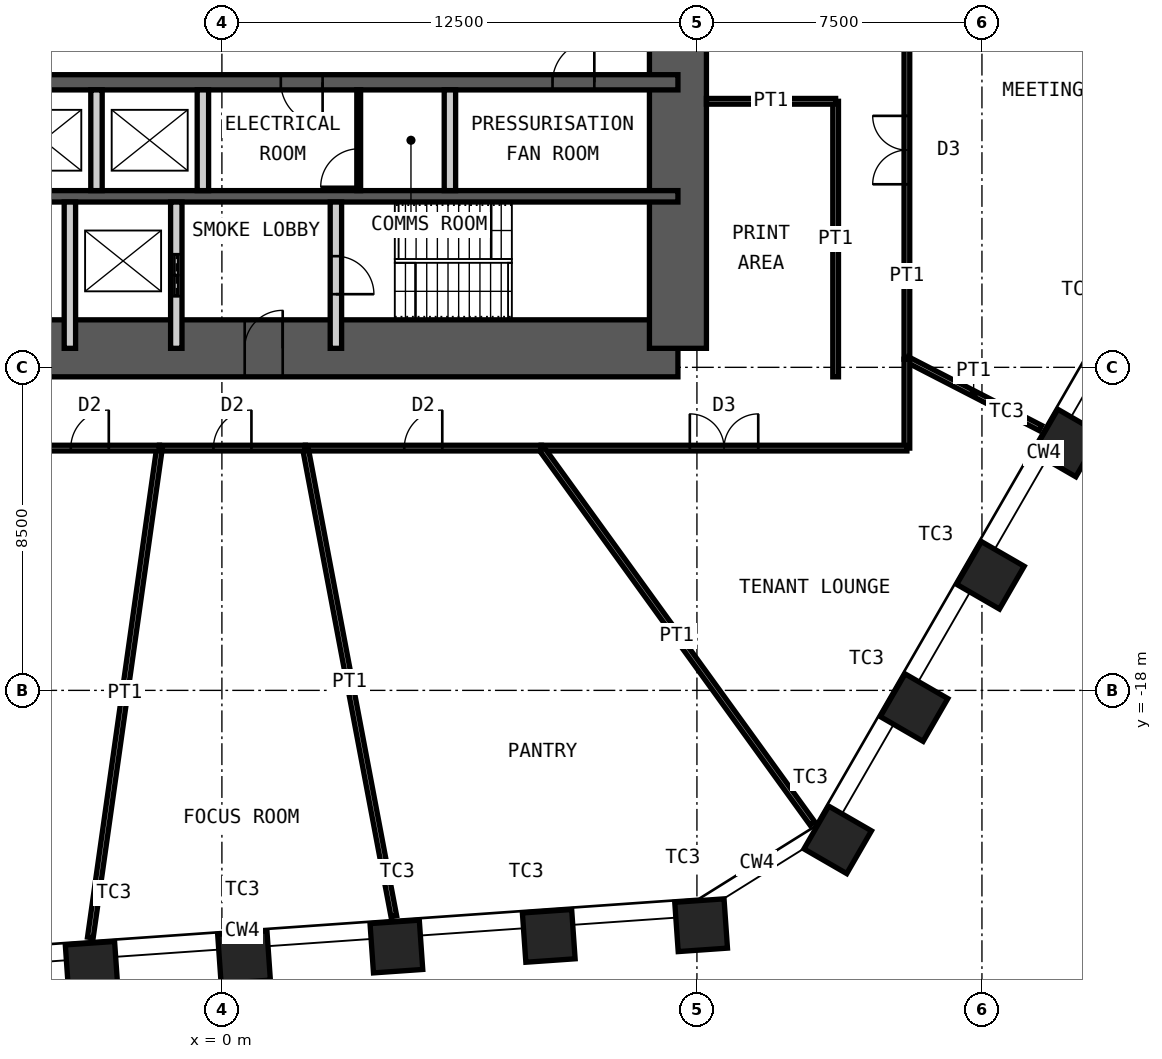
"""IFC4 building model, lengths in metres.
Left out: names, types, materials, properties, quantities, classifications, styles, units other than length and angle.
Written with IfcOpenShell. Run it as: python <this file> out.ifc"""

import sys

from ifc_helpers import new_model, si_unit, direction, frame, frame_2d, origin, origin_2d, place, context, subcontext, project, spatial, rectangle, hollow_rectangle, extrude, element, fill, save


model = new_model("IFC4")
c1 = context("Model", 3, precision=1e-05, world=origin(), true_north=direction((0.0, 1.0)))
c2 = subcontext(c1, "Body", "Model", "MODEL_VIEW")
j1 = project(units=[si_unit("LENGTHUNIT", "METRE"), si_unit("PLANEANGLEUNIT", "RADIAN")], contexts=[c1])
p1 = place(None, origin())
s1 = spatial("IfcSite", under=j1, at=p1, CompositionType="ELEMENT")
p2 = place(p1, origin())
s2 = spatial("IfcBuilding", under=s1, at=p2, CompositionType="ELEMENT")
p3 = place(p2, frame((0.0, 0.0, 119.8)))
s3 = spatial("IfcBuildingStorey", under=s2, at=p3, CompositionType="ELEMENT", Elevation=119.8)
for number, where, z_axis, x_axis in (
    (1, (22.233, -11.491, 0.0), (0.0, 0.0, 1.0), (0.5, 0.866, 0.0)),
    (2, (20.223, -14.972, 0.0), (0.0, 0.0, 1.0), (0.5, 0.866, 0.0)),
    (3, (18.214, -18.453, 0.0), (0.0, 0.0, 1.0), (0.5, 0.866, 0.0)),
    (4, (16.204, -21.933, 0.0), (0.0, 0.0, 1.0), (0.5, 0.866, 0.0)),
    (5, (12.61, -24.179, 0.0), (0.0, 0.0, 1.0), (0.998, 0.07, 0.0)),
    (6, (8.601, -24.46, 0.0), (0.0, 0.0, 1.0), (0.998, 0.07, 0.0)),
    (7, (4.592, -24.74, 0.0), (0.0, 0.0, 1.0), (0.998, 0.07, 0.0)),
    (8, (0.582, -25.02, 0.0), (0.0, 0.0, 1.0), (0.998, 0.07, 0.0)),
    (9, (-3.427, -25.301, 0.0), (0.0, 0.0, 1.0), (0.998, 0.07, 0.0)),
):
    element("IfcColumn", number, at=place(p3, frame(where, z_axis=z_axis, x_axis=x_axis)), inside=s3, PredefinedType="COLUMN", context=c2, shape_type="SweptSolid", body=[
        extrude(hollow_rectangle(XDim=1.3, YDim=1.3, WallThickness=0.1, at=origin_2d()), origin(), (0.0, 0.0, 1.0), 4.2),
    ])
p4 = place(p3, frame((-12.0, -9.0, 0.0), z_axis=(0.0, 0.0, 1.0), x_axis=(1.0, 0.0, 0.0)))
e10 = element("IfcWall", 10, at=p4, inside=s3, PredefinedType="SHEAR", context=c2, shape_type="SweptSolid", body=[
    extrude(rectangle(XDim=24.0, YDim=1.5, at=frame_2d((12.0, 0.0))), origin(), (0.0, 0.0, 1.0), 4.2),
])
p5 = place(p4, frame((1.35, 0.0, 0.0)))
e11 = element("IfcOpeningElement", 11, at=p5, cuts=e10, PredefinedType="OPENING", context=c2, shape_type="SweptSolid", body=[
    extrude(rectangle(XDim=1.0, YDim=2.1, at=frame_2d((0.5, 1.05))), frame((0.0, 0.76, 0.0), z_axis=(0.0, -1.0, 0.0), x_axis=(1.0, 0.0, 0.0)), (0.0, 0.0, 1.0), 1.52),
])
p6 = place(p4, frame((5.325, 0.0, 0.0)))
e12 = element("IfcOpeningElement", 12, at=p6, cuts=e10, PredefinedType="OPENING", context=c2, shape_type="SweptSolid", body=[
    extrude(rectangle(XDim=1.15, YDim=2.1, at=frame_2d((0.575, 1.05))), frame((0.0, 0.76, 0.0), z_axis=(0.0, -1.0, 0.0), x_axis=(1.0, 0.0, 0.0)), (0.0, 0.0, 1.0), 1.52),
])
p7 = place(p4, frame((12.6, 0.0, 0.0)))
e13 = element("IfcOpeningElement", 13, at=p7, cuts=e10, PredefinedType="OPENING", context=c2, shape_type="SweptSolid", body=[
    extrude(rectangle(XDim=1.0, YDim=2.1, at=frame_2d((0.5, 1.05))), frame((0.0, 0.76, 0.0), z_axis=(0.0, -1.0, 0.0), x_axis=(1.0, 0.0, 0.0)), (0.0, 0.0, 1.0), 1.52),
])
p8 = place(p3, frame((12.0, -9.0, 0.0), z_axis=(0.0, 0.0, 1.0), x_axis=(0.0, 1.0, 0.0)))
e14 = element("IfcWall", 14, at=p8, inside=s3, PredefinedType="SHEAR", context=c2, shape_type="SweptSolid", body=[
    extrude(rectangle(XDim=18.0, YDim=1.5, at=frame_2d((9.0, 0.0))), origin(), (0.0, 0.0, 1.0), 4.2),
])
p9 = place(p8, frame((8.1, 0.0, 0.0)))
e15 = element("IfcOpeningElement", 15, at=p9, cuts=e14, PredefinedType="OPENING", context=c2, shape_type="SweptSolid", body=[
    extrude(rectangle(XDim=1.8, YDim=2.1, at=frame_2d((0.9, 1.05))), frame((0.0, 0.76, 0.0), z_axis=(0.0, -1.0, 0.0), x_axis=(1.0, 0.0, 0.0)), (0.0, 0.0, 1.0), 1.52),
])
p10 = place(p3, frame((-12.0, -2.0, 0.0), z_axis=(0.0, 0.0, 1.0), x_axis=(1.0, 0.0, 0.0)))
e16 = element("IfcWall", 16, at=p10, inside=s3, PredefinedType="SHEAR", context=c2, shape_type="SweptSolid", body=[
    extrude(rectangle(XDim=24.0, YDim=0.4, at=frame_2d((12.0, 0.0))), origin(), (0.0, 0.0, 1.0), 4.2),
])
p11 = place(p10, frame((1.1, 0.0, 0.0)))
e17 = element("IfcOpeningElement", 17, at=p11, cuts=e16, PredefinedType="OPENING", context=c2, shape_type="SweptSolid", body=[
    extrude(rectangle(XDim=1.1, YDim=2.1, at=frame_2d((0.55, 1.05))), frame((0.0, 0.21, 0.0), z_axis=(0.0, -1.0, 0.0), x_axis=(1.0, 0.0, 0.0)), (0.0, 0.0, 1.0), 0.42),
])
p12 = place(p10, frame((13.55, 0.0, 0.0)))
e18 = element("IfcOpeningElement", 18, at=p12, cuts=e16, PredefinedType="OPENING", context=c2, shape_type="SweptSolid", body=[
    extrude(rectangle(XDim=1.1, YDim=2.1, at=frame_2d((0.55, 1.05))), frame((0.0, 0.21, 0.0), z_axis=(0.0, -1.0, 0.0), x_axis=(1.0, 0.0, 0.0)), (0.0, 0.0, 1.0), 0.42),
])
p13 = place(p10, frame((20.7, 0.0, 0.0)))
e19 = element("IfcOpeningElement", 19, at=p13, cuts=e16, PredefinedType="OPENING", context=c2, shape_type="SweptSolid", body=[
    extrude(rectangle(XDim=1.1, YDim=2.1, at=frame_2d((0.55, 1.05))), frame((0.0, 0.21, 0.0), z_axis=(0.0, -1.0, 0.0), x_axis=(1.0, 0.0, 0.0)), (0.0, 0.0, 1.0), 0.42),
])
p14 = place(p10, frame((4.0, 0.0, 0.0)))
e20 = element("IfcOpeningElement", 20, at=p14, cuts=e16, PredefinedType="OPENING", context=c2, shape_type="SweptSolid", body=[
    extrude(rectangle(XDim=1.0, YDim=2.1, at=frame_2d((0.5, 1.05))), frame((0.0, 0.21, 0.0), z_axis=(0.0, -1.0, 0.0), x_axis=(1.0, 0.0, 0.0)), (0.0, 0.0, 1.0), 0.42),
])
p15 = place(p3, frame((-12.0, -5.0, 0.0), z_axis=(0.0, 0.0, 1.0), x_axis=(1.0, 0.0, 0.0)))
e21 = element("IfcWall", 21, at=p15, inside=s3, PredefinedType="SHEAR", context=c2, shape_type="SweptSolid", body=[
    extrude(rectangle(XDim=24.0, YDim=0.3, at=frame_2d((12.0, 0.0))), origin(), (0.0, 0.0, 1.0), 4.2),
])
for number, where, z_axis, x_axis in (
    (22, (-3.3, -4.85, 0.0), (0.0, 0.0, 1.0), (0.0, 1.0, 0.0)),
    (23, (-0.5, -4.85, 0.0), (0.0, 0.0, 1.0), (0.0, 1.0, 0.0)),
    (24, (6.0, -4.85, 0.0), (0.0, 0.0, 1.0), (0.0, 1.0, 0.0)),
):
    element("IfcWall", number, at=place(p3, frame(where, z_axis=z_axis, x_axis=x_axis)), inside=s3, PredefinedType="PARTITIONING", context=c2, shape_type="SweptSolid", body=[
        extrude(rectangle(XDim=2.65, YDim=0.3, at=frame_2d((1.325, 0.0))), origin(), (0.0, 0.0, 1.0), 3.98),
    ])
p16 = place(p3, frame((-4.0, -9.0, 0.0), z_axis=(0.0, 0.0, 1.0), x_axis=(0.0, 1.0, 0.0)))
e25 = element("IfcWall", 25, at=p16, inside=s3, PredefinedType="PARTITIONING", context=c2, shape_type="SweptSolid", body=[
    extrude(rectangle(XDim=3.85, YDim=0.3, at=frame_2d((1.925, 0.0))), origin(), (0.0, 0.0, 1.0), 3.98),
])
p17 = place(p3, frame((-1.2, -9.0, 0.0), z_axis=(0.0, 0.0, 1.0), x_axis=(0.0, 1.0, 0.0)))
e26 = element("IfcWall", 26, at=p17, inside=s3, PredefinedType="PARTITIONING", context=c2, shape_type="SweptSolid", body=[
    extrude(rectangle(XDim=3.85, YDim=0.3, at=frame_2d((1.925, 0.0))), origin(), (0.0, 0.0, 1.0), 3.98),
])
p18 = place(p17, frame((1.375, 0.0, 0.0)))
e27 = element("IfcOpeningElement", 27, at=p18, cuts=e26, PredefinedType="OPENING", context=c2, shape_type="SweptSolid", body=[
    extrude(rectangle(XDim=1.1, YDim=2.4, at=frame_2d((0.55, 1.2))), frame((0.0, 0.16, 0.0), z_axis=(0.0, -1.0, 0.0), x_axis=(1.0, 0.0, 0.0)), (0.0, 0.0, 1.0), 0.32),
])
p19 = place(p3, frame((3.0, -9.0, 0.0), z_axis=(0.0, 0.0, 1.0), x_axis=(0.0, 1.0, 0.0)))
e28 = element("IfcWall", 28, at=p19, inside=s3, PredefinedType="PARTITIONING", context=c2, shape_type="SweptSolid", body=[
    extrude(rectangle(XDim=3.85, YDim=0.3, at=frame_2d((1.925, 0.0))), origin(), (0.0, 0.0, 1.0), 3.98),
])
p20 = place(p19, frame((1.425, 0.0, 0.0)))
e29 = element("IfcOpeningElement", 29, at=p20, cuts=e28, PredefinedType="OPENING", context=c2, shape_type="SweptSolid", body=[
    extrude(rectangle(XDim=1.0, YDim=2.1, at=frame_2d((0.5, 1.05))), frame((0.0, 0.16, 0.0), z_axis=(0.0, -1.0, 0.0), x_axis=(1.0, 0.0, 0.0)), (0.0, 0.0, 1.0), 0.32),
])
p21 = place(p3, frame((3.6, -4.85, 0.0), z_axis=(0.0, 0.0, 1.0), x_axis=(0.0, 1.0, 0.0)))
e30 = element("IfcWall", 30, at=p21, inside=s3, PredefinedType="PARTITIONING", context=c2, shape_type="SweptSolid", body=[
    extrude(rectangle(XDim=2.65, YDim=0.1, at=frame_2d((1.325, 0.0))), origin(), (0.0, 0.0, 1.0), 3.98),
])
p22 = place(p21, frame((0.1, 0.0, 0.0)))
e31 = element("IfcOpeningElement", 31, at=p22, cuts=e30, PredefinedType="OPENING", context=c2, shape_type="SweptSolid", body=[
    extrude(rectangle(XDim=1.0, YDim=2.4, at=frame_2d((0.5, 1.2))), frame((0.0, 0.06, 0.0), z_axis=(0.0, -1.0, 0.0), x_axis=(1.0, 0.0, 0.0)), (0.0, 0.0, 1.0), 0.12),
])
p23 = place(p3, frame((18.025, 1.719, 0.0), z_axis=(0.0, 0.0, 1.0), x_axis=(0.0, -1.0, 0.0)))
e32 = element("IfcWall", 32, at=p23, inside=s3, PredefinedType="PARTITIONING", context=c2, shape_type="SweptSolid", body=[
    extrude(rectangle(XDim=11.006, YDim=0.15, at=frame_2d((5.503, 0.0))), origin(), (0.0, 0.0, 1.0), 4.03),
])
p24 = place(p23, frame((4.603, 0.0, 0.0)))
e33 = element("IfcOpeningElement", 33, at=p24, cuts=e32, PredefinedType="OPENING", context=c2, shape_type="SweptSolid", body=[
    extrude(rectangle(XDim=1.8, YDim=2.4, at=frame_2d((0.9, 1.2))), frame((0.0, 0.085, 0.0), z_axis=(0.0, -1.0, 0.0), x_axis=(1.0, 0.0, 0.0)), (0.0, 0.0, 1.0), 0.17),
])
p25 = place(p3, frame((21.538, -11.096, 0.0), z_axis=(0.0, 0.0, 1.0), x_axis=(-0.888987513346, 0.457931437134, 0.0)))
e34 = element("IfcWall", 34, at=p25, inside=s3, PredefinedType="PARTITIONING", context=c2, shape_type="SweptSolid", body=[
    extrude(rectangle(XDim=3.952, YDim=0.15, at=frame_2d((1.976, 0.0))), origin(), (0.0, 0.0, 1.0), 3.33),
])
p26 = place(p3, frame((18.025, -9.286, 0.0), z_axis=(0.0, 0.0, 1.0), x_axis=(0.0, -1.0, 0.0)))
e35 = element("IfcWall", 35, at=p26, inside=s3, PredefinedType="PARTITIONING", context=c2, shape_type="SweptSolid", body=[
    extrude(rectangle(XDim=2.339, YDim=0.15, at=frame_2d((1.169, 0.0))), origin(), (0.0, 0.0, 1.0), 4.03),
])
p27 = place(p3, frame((18.025, -11.625, 0.0), z_axis=(0.0, 0.0, 1.0), x_axis=(-1.0, 0.0, 0.0)))
e36 = element("IfcWall", 36, at=p27, inside=s3, PredefinedType="PARTITIONING", context=c2, shape_type="SweptSolid", body=[
    extrude(rectangle(XDim=9.624, YDim=0.15, at=frame_2d((4.812, 0.0))), origin(), (0.0, 0.0, 1.0), 4.03),
])
p28 = place(p27, frame((3.912, 0.0, 0.0)))
e37 = element("IfcOpeningElement", 37, at=p28, cuts=e36, PredefinedType="OPENING", context=c2, shape_type="SweptSolid", body=[
    extrude(rectangle(XDim=1.8, YDim=2.4, at=frame_2d((0.9, 1.2))), frame((0.0, 0.085, 0.0), z_axis=(0.0, -1.0, 0.0), x_axis=(1.0, 0.0, 0.0)), (0.0, 0.0, 1.0), 0.17),
])
p29 = place(p3, frame((15.54, -21.502, 0.0), z_axis=(0.0, 0.0, 1.0), x_axis=(-0.585731902034, 0.810504866697, 0.0)))
e38 = element("IfcWall", 38, at=p29, inside=s3, PredefinedType="PARTITIONING", context=c2, shape_type="SweptSolid", body=[
    extrude(rectangle(XDim=12.187, YDim=0.15, at=frame_2d((6.093, 0.0))), origin(), (0.0, 0.0, 1.0), 2.93),
])
p30 = place(p3, frame((8.401, -11.625, 0.0), z_axis=(0.0, 0.0, 1.0), x_axis=(-1.0, 0.0, 0.0)))
e39 = element("IfcWall", 39, at=p30, inside=s3, PredefinedType="PARTITIONING", context=c2, shape_type="SweptSolid", body=[
    extrude(rectangle(XDim=6.205, YDim=0.15, at=frame_2d((3.103, 0.0))), origin(), (0.0, 0.0, 1.0), 4.03),
])
p31 = place(p30, frame((2.602, 0.0, 0.0)))
e40 = element("IfcOpeningElement", 40, at=p31, cuts=e39, PredefinedType="OPENING", context=c2, shape_type="SweptSolid", body=[
    extrude(rectangle(XDim=1.0, YDim=2.4, at=frame_2d((0.5, 1.2))), frame((0.0, 0.085, 0.0), z_axis=(0.0, -1.0, 0.0), x_axis=(1.0, 0.0, 0.0)), (0.0, 0.0, 1.0), 0.17),
])
p32 = place(p3, frame((4.524, -23.943, 0.0), z_axis=(0.0, 0.0, 1.0), x_axis=(-0.185671124909, 0.98261194445, 0.0)))
e41 = element("IfcWall", 41, at=p32, inside=s3, PredefinedType="PARTITIONING", context=c2, shape_type="SweptSolid", body=[
    extrude(rectangle(XDim=12.536, YDim=0.15, at=frame_2d((6.268, 0.0))), origin(), (0.0, 0.0, 1.0), 3.33),
])
p33 = place(p3, frame((2.197, -11.625, 0.0), z_axis=(0.0, 0.0, 1.0), x_axis=(-1.0, 0.0, 0.0)))
e42 = element("IfcWall", 42, at=p33, inside=s3, PredefinedType="PARTITIONING", context=c2, shape_type="SweptSolid", body=[
    extrude(rectangle(XDim=3.839, YDim=0.15, at=frame_2d((1.919, 0.0))), origin(), (0.0, 0.0, 1.0), 4.03),
])
p34 = place(p33, frame((1.419, 0.0, 0.0)))
e43 = element("IfcOpeningElement", 43, at=p34, cuts=e42, PredefinedType="OPENING", context=c2, shape_type="SweptSolid", body=[
    extrude(rectangle(XDim=1.0, YDim=2.4, at=frame_2d((0.5, 1.2))), frame((0.0, 0.085, 0.0), z_axis=(0.0, -1.0, 0.0), x_axis=(1.0, 0.0, 0.0)), (0.0, 0.0, 1.0), 0.17),
])
p35 = place(p3, frame((-3.462, -24.503, 0.0), z_axis=(0.0, 0.0, 1.0), x_axis=(0.139899618934, 0.990165691499, 0.0)))
e44 = element("IfcWall", 44, at=p35, inside=s3, PredefinedType="PARTITIONING", context=c2, shape_type="SweptSolid", body=[
    extrude(rectangle(XDim=13.006, YDim=0.15, at=frame_2d((6.503, 0.0))), origin(), (0.0, 0.0, 1.0), 3.33),
])
p36 = place(p3, frame((-1.642, -11.625, 0.0), z_axis=(0.0, 0.0, 1.0), x_axis=(-1.0, 0.0, 0.0)))
e45 = element("IfcWall", 45, at=p36, inside=s3, PredefinedType="PARTITIONING", context=c2, shape_type="SweptSolid", body=[
    extrude(rectangle(XDim=3.668, YDim=0.15, at=frame_2d((1.834, 0.0))), origin(), (0.0, 0.0, 1.0), 4.03),
])
p37 = place(p36, frame((1.334, 0.0, 0.0)))
e46 = element("IfcOpeningElement", 46, at=p37, cuts=e45, PredefinedType="OPENING", context=c2, shape_type="SweptSolid", body=[
    extrude(rectangle(XDim=1.0, YDim=2.4, at=frame_2d((0.5, 1.2))), frame((0.0, 0.085, 0.0), z_axis=(0.0, -1.0, 0.0), x_axis=(1.0, 0.0, 0.0)), (0.0, 0.0, 1.0), 0.17),
])
p38 = place(p3, frame((16.15, -9.75, 0.0), z_axis=(0.0, 0.0, 1.0), x_axis=(0.0, 1.0, 0.0)))
e47 = element("IfcWall", 47, at=p38, inside=s3, PredefinedType="PARTITIONING", context=c2, shape_type="SweptSolid", body=[
    extrude(rectangle(XDim=7.25, YDim=0.15, at=frame_2d((3.625, 0.0))), origin(), (0.0, 0.0, 1.0), 4.03),
])
p39 = place(p3, frame((12.75, -2.5, 0.0), z_axis=(0.0, 0.0, 1.0), x_axis=(1.0, 0.0, 0.0)))
e48 = element("IfcWall", 48, at=p39, inside=s3, PredefinedType="PARTITIONING", context=c2, shape_type="SweptSolid", body=[
    extrude(rectangle(XDim=3.4, YDim=0.15, at=frame_2d((1.7, 0.0))), origin(), (0.0, 0.0, 1.0), 3.33),
])
p40 = place(p7, origin())
e49 = element("IfcDoor", 49, at=p40, inside=s3, OperationType="SINGLE_SWING_LEFT", PredefinedType="DOOR", context=c2, shape_type="SweptSolid", body=[
    extrude(rectangle(XDim=1.0, YDim=2.1, at=frame_2d((0.5, 1.05))), frame((0.0, 0.025, 0.0), z_axis=(0.0, -1.0, 0.0), x_axis=(1.0, 0.0, 0.0)), (0.0, 0.0, 1.0), 0.05),
])
fill(e13, e49)
p41 = place(p20, origin())
e50 = element("IfcDoor", 50, at=p41, inside=s3, OperationType="SINGLE_SWING_LEFT", PredefinedType="DOOR", context=c2, shape_type="SweptSolid", body=[
    extrude(rectangle(XDim=1.0, YDim=2.1, at=frame_2d((0.5, 1.05))), frame((0.0, 0.025, 0.0), z_axis=(0.0, -1.0, 0.0), x_axis=(1.0, 0.0, 0.0)), (0.0, 0.0, 1.0), 0.05),
])
fill(e29, e50)
p42 = place(p12, origin())
e51 = element("IfcDoor", 51, at=p42, inside=s3, OperationType="SINGLE_SWING_RIGHT", PredefinedType="DOOR", context=c2, shape_type="SweptSolid", body=[
    extrude(rectangle(XDim=1.1, YDim=2.1, at=frame_2d((0.55, 1.05))), frame((0.0, 0.025, 0.0), z_axis=(0.0, -1.0, 0.0), x_axis=(1.0, 0.0, 0.0)), (0.0, 0.0, 1.0), 0.05),
])
fill(e18, e51)
p43 = place(p13, origin())
e52 = element("IfcDoor", 52, at=p43, inside=s3, OperationType="SINGLE_SWING_LEFT", PredefinedType="DOOR", context=c2, shape_type="SweptSolid", body=[
    extrude(rectangle(XDim=1.1, YDim=2.1, at=frame_2d((0.55, 1.05))), frame((0.0, 0.025, 0.0), z_axis=(0.0, -1.0, 0.0), x_axis=(1.0, 0.0, 0.0)), (0.0, 0.0, 1.0), 0.05),
])
fill(e19, e52)
p44 = place(p18, origin())
e53 = element("IfcDoor", 53, at=p44, inside=s3, OperationType="DOUBLE_DOOR_SLIDING", PredefinedType="DOOR", context=c2, shape_type="SweptSolid", body=[
    extrude(rectangle(XDim=1.1, YDim=2.4, at=frame_2d((0.55, 1.2))), frame((0.0, 0.025, 0.0), z_axis=(0.0, -1.0, 0.0), x_axis=(1.0, 0.0, 0.0)), (0.0, 0.0, 1.0), 0.05),
])
fill(e27, e53)
p45 = place(p22, origin())
e54 = element("IfcDoor", 54, at=p45, inside=s3, OperationType="SINGLE_SWING_RIGHT", PredefinedType="DOOR", context=c2, shape_type="SweptSolid", body=[
    extrude(rectangle(XDim=1.0, YDim=2.4, at=frame_2d((0.5, 1.2))), frame((0.0, 0.025, 0.0), z_axis=(0.0, -1.0, 0.0), x_axis=(1.0, 0.0, 0.0)), (0.0, 0.0, 1.0), 0.05),
])
fill(e31, e54)
p46 = place(p24, origin())
e55 = element("IfcDoor", 55, at=p46, inside=s3, OperationType="DOUBLE_DOOR_DOUBLE_SWING", PredefinedType="DOOR", context=c2, shape_type="SweptSolid", body=[
    extrude(rectangle(XDim=1.8, YDim=2.4, at=frame_2d((0.9, 1.2))), frame((0.0, 0.025, 0.0), z_axis=(0.0, -1.0, 0.0), x_axis=(1.0, 0.0, 0.0)), (0.0, 0.0, 1.0), 0.05),
])
fill(e33, e55)
p47 = place(p28, origin())
e56 = element("IfcDoor", 56, at=p47, inside=s3, OperationType="DOUBLE_DOOR_DOUBLE_SWING", PredefinedType="DOOR", context=c2, shape_type="SweptSolid", body=[
    extrude(rectangle(XDim=1.8, YDim=2.4, at=frame_2d((0.9, 1.2))), frame((0.0, 0.025, 0.0), z_axis=(0.0, -1.0, 0.0), x_axis=(1.0, 0.0, 0.0)), (0.0, 0.0, 1.0), 0.05),
])
fill(e37, e56)
p48 = place(p31, origin())
e57 = element("IfcDoor", 57, at=p48, inside=s3, OperationType="SINGLE_SWING_LEFT", PredefinedType="DOOR", context=c2, shape_type="SweptSolid", body=[
    extrude(rectangle(XDim=1.0, YDim=2.4, at=frame_2d((0.5, 1.2))), frame((0.0, 0.025, 0.0), z_axis=(0.0, -1.0, 0.0), x_axis=(1.0, 0.0, 0.0)), (0.0, 0.0, 1.0), 0.05),
])
fill(e40, e57)
p49 = place(p34, origin())
e58 = element("IfcDoor", 58, at=p49, inside=s3, OperationType="SINGLE_SWING_LEFT", PredefinedType="DOOR", context=c2, shape_type="SweptSolid", body=[
    extrude(rectangle(XDim=1.0, YDim=2.4, at=frame_2d((0.5, 1.2))), frame((0.0, 0.025, 0.0), z_axis=(0.0, -1.0, 0.0), x_axis=(1.0, 0.0, 0.0)), (0.0, 0.0, 1.0), 0.05),
])
fill(e43, e58)
p50 = place(p37, origin())
e59 = element("IfcDoor", 59, at=p50, inside=s3, OperationType="SINGLE_SWING_LEFT", PredefinedType="DOOR", context=c2, shape_type="SweptSolid", body=[
    extrude(rectangle(XDim=1.0, YDim=2.4, at=frame_2d((0.5, 1.2))), frame((0.0, 0.025, 0.0), z_axis=(0.0, -1.0, 0.0), x_axis=(1.0, 0.0, 0.0)), (0.0, 0.0, 1.0), 0.05),
])
fill(e46, e59)
save(model, sys.argv[1])
